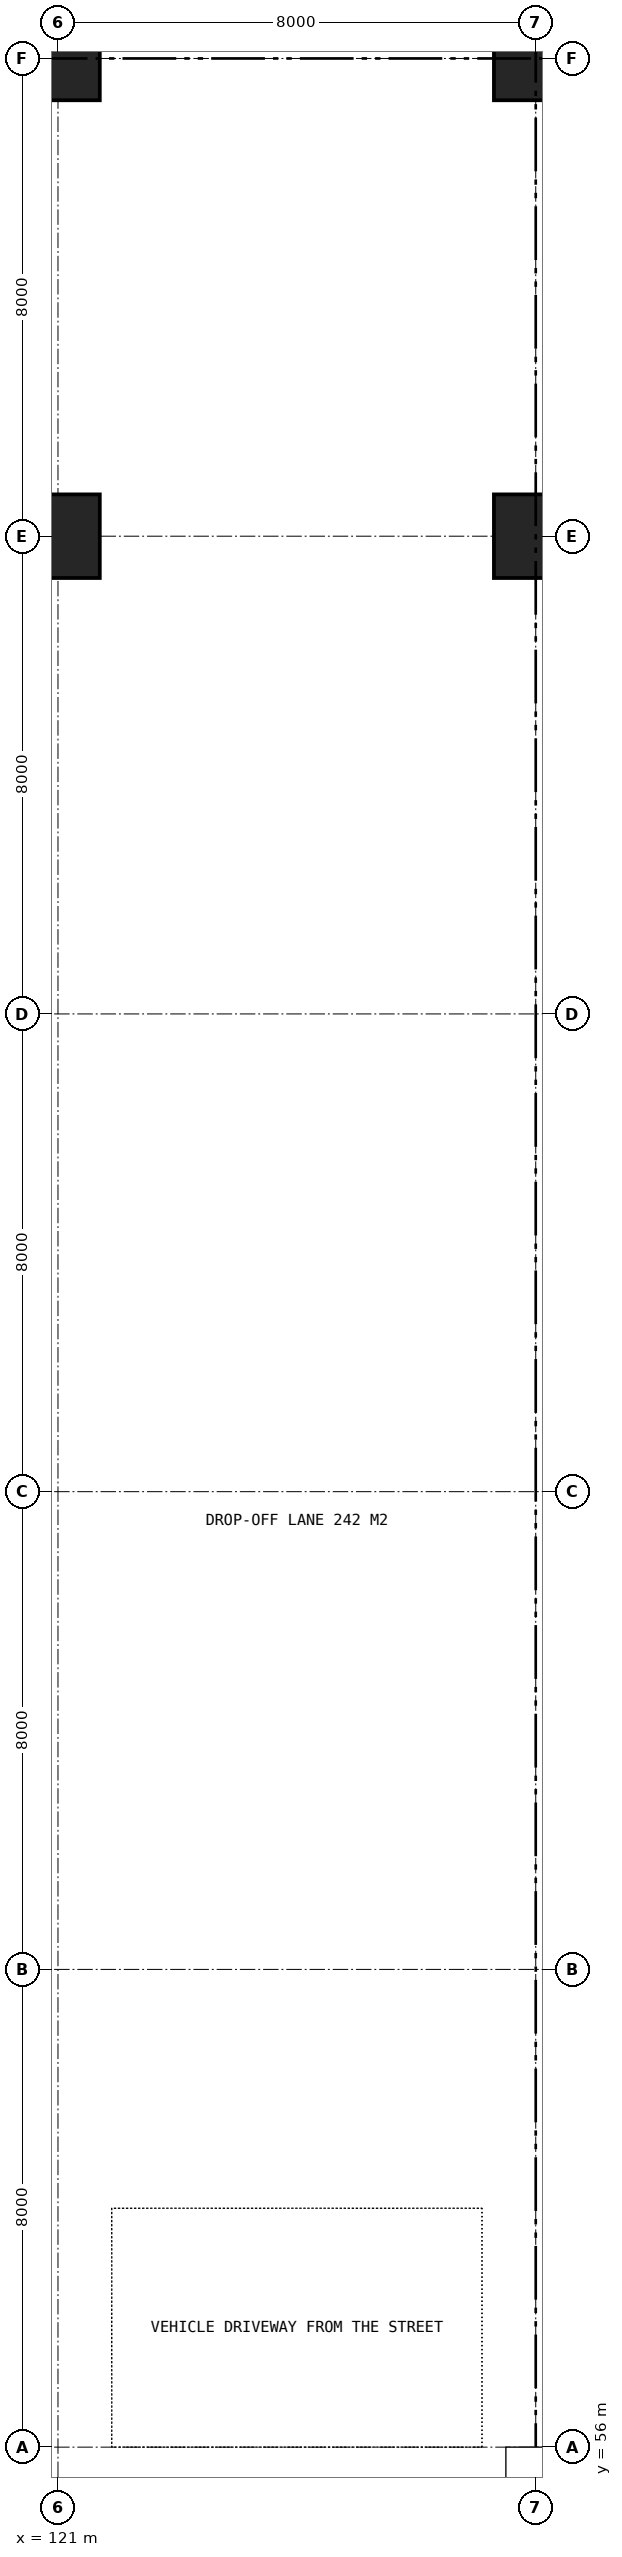
"""IFC4 building model, lengths in metres.
Left out: names, types, materials, properties, quantities, classifications, styles, units other than length and angle.
Written with IfcOpenShell. Run it as: python <this file> out.ifc"""

import sys

from ifc_helpers import new_model, si_unit, direction, frame, origin, origin_2d, place, context, subcontext, project, spatial, circle, extrude, element, save


model = new_model("IFC4")
c1 = context("Model", 3, precision=1e-05, world=origin(), true_north=direction((0.0, 1.0)))
c2 = subcontext(c1, "Body", "Model", "MODEL_VIEW")
j1 = project(units=[si_unit("LENGTHUNIT", "METRE"), si_unit("PLANEANGLEUNIT", "RADIAN")], contexts=[c1])
p1 = place(None, origin())
s1 = spatial("IfcSite", under=j1, at=p1, CompositionType="ELEMENT")
p2 = place(p1, origin())
s2 = spatial("IfcBuilding", under=s1, at=p2, CompositionType="ELEMENT")
p3 = place(p2, origin())
s3 = spatial("IfcBuildingStorey", under=s2, at=p3, CompositionType="ELEMENT", Elevation=0.0)
for number, where, z_axis, x_axis in (
    (1, (121.0, 88.0, -0.4), (0.0, 0.0, 1.0), (1.0, 0.0, 0.0)),
    (2, (121.0, 96.0, -0.4), (0.0, 0.0, 1.0), (1.0, 0.0, 0.0)),
    (3, (129.0, 88.0, -0.4), (0.0, 0.0, 1.0), (1.0, 0.0, 0.0)),
    (4, (129.0, 96.0, -0.4), (0.0, 0.0, 1.0), (1.0, 0.0, 0.0)),
):
    element("IfcColumn", number, at=place(p3, frame(where, z_axis=z_axis, x_axis=x_axis)), inside=s3, PredefinedType="COLUMN", context=c2, shape_type="SweptSolid", body=[
        extrude(circle(Radius=0.7, at=origin_2d()), origin(), (0.0, 0.0, 1.0), 10.4),
    ])
save(model, sys.argv[1])
